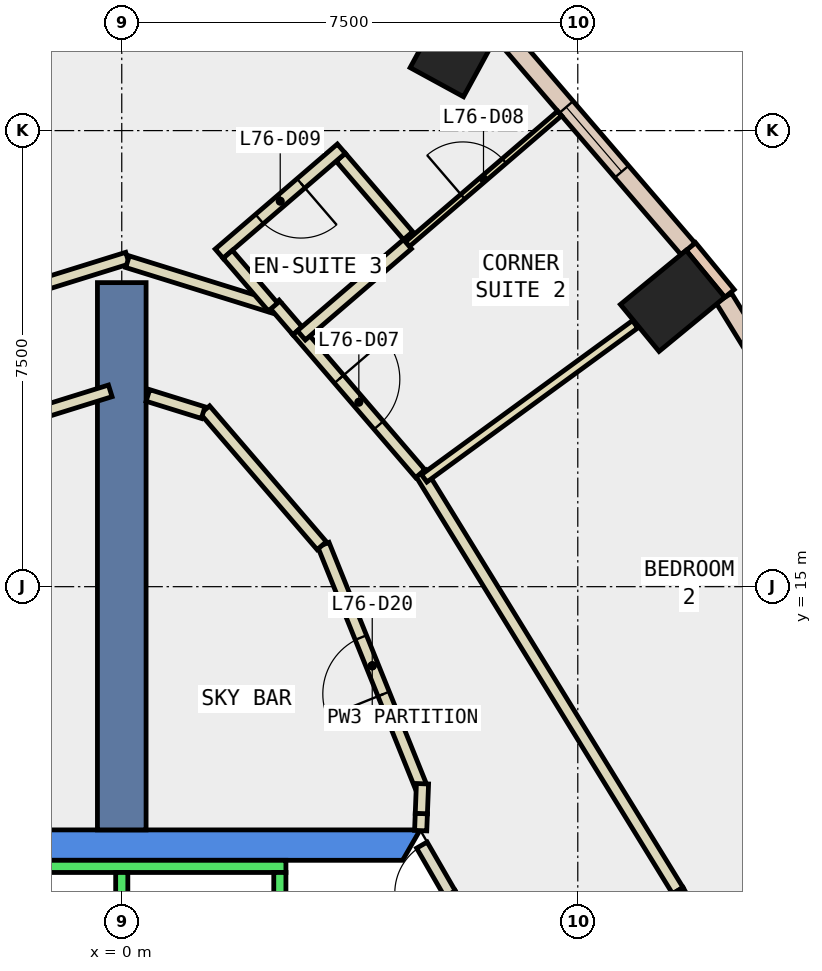
"""IFC4 building model, lengths in metres.
Left out: names, types, materials, properties, quantities, classifications, styles, units other than length and angle.
Written with IfcOpenShell. Run it as: python <this file> out.ifc"""

import sys

from ifc_helpers import new_model, si_unit, direction, frame, frame_2d, origin, origin_2d, place, context, subcontext, project, spatial, polyline, rectangle, outline, extrude, element, fill, save


model = new_model("IFC4")
c1 = context("Model", 3, precision=1e-05, world=origin(), true_north=direction((0.0, 1.0)))
c2 = subcontext(c1, "Body", "Model", "MODEL_VIEW")
j1 = project(units=[si_unit("LENGTHUNIT", "METRE"), si_unit("PLANEANGLEUNIT", "RADIAN")], contexts=[c1])
p1 = place(None, origin())
s1 = spatial("IfcSite", under=j1, at=p1, CompositionType="ELEMENT")
p2 = place(p1, origin())
s2 = spatial("IfcBuilding", under=s1, at=p2, CompositionType="ELEMENT")
p3 = place(p2, frame((0.0, 0.0, 322.4)))
s3 = spatial("IfcBuildingStorey", under=s2, at=p3, CompositionType="ELEMENT", Elevation=322.4)
for number, where, z_axis, x_axis in (
    (1, (9.059, 19.7, -0.34), (0.0, 0.0, 1.0), (-0.636, 0.772, 0.0)),
    (2, (5.517, 23.911, -0.34), (0.0, 0.0, 1.0), (-0.878, 0.479, 0.0)),
):
    element("IfcColumn", number, at=place(p3, frame(where, z_axis=z_axis, x_axis=x_axis)), inside=s3, PredefinedType="COLUMN", context=c2, shape_type="SweptSolid", body=[
        extrude(rectangle(XDim=1.0, YDim=1.4, at=origin_2d()), origin(), (0.0, 0.0, 1.0), 3.34),
    ])
p4 = place(p3, frame((0.0, 0.0, -0.34)))
e3 = element("IfcWall", 3, at=p4, inside=s3, PredefinedType="SHEAR", context=c2, shape_type="SweptSolid", body=[
    extrude(outline(polyline([(5.486, 9.998), (5.053, 9.748), (9.238, 2.5), (9.815, 2.5), (5.486, 9.998)])), origin(), (0.0, 0.0, 1.0), 3.34),
])
p5 = place(p3, frame((0.0, 0.0, -0.34)))
e4 = element("IfcWall", 4, at=p5, inside=s3, PredefinedType="SHEAR", context=c2, shape_type="SweptSolid", body=[
    extrude(outline(polyline([(4.907, 11.0), (-4.907, 11.0), (-4.619, 10.5), (4.619, 10.5), (4.907, 11.0)])), origin(), (0.0, 0.0, 1.0), 3.34),
])
p6 = place(p3, frame((0.0, 11.0, -0.34), z_axis=(0.0, 0.0, 1.0), x_axis=(0.0, 1.0, 0.0)))
e5 = element("IfcWall", 5, at=p6, inside=s3, PredefinedType="SHEAR", context=c2, shape_type="SweptSolid", body=[
    extrude(rectangle(XDim=9.0, YDim=0.8, at=frame_2d((4.5, 0.0))), origin(), (0.0, 0.0, 1.0), 3.34),
])
p7 = place(p3, frame((9.995, 19.822, 0.0), z_axis=(0.0, 0.0, 1.0), x_axis=(-0.635998056672, 0.771690658172, 0.0)))
e6 = element("IfcWall", 6, at=p7, inside=s3, PredefinedType="STANDARD", context=c2, shape_type="SweptSolid", body=[
    extrude(rectangle(XDim=1.0, YDim=0.2, at=frame_2d((0.5, 0.0))), origin(), (0.0, 0.0, 1.0), 3.0),
])
p8 = place(p3, frame((13.823, 13.372, 0.0), z_axis=(0.0, 0.0, 1.0), x_axis=(-0.524004608874, 0.851715427757, 0.0)))
e7 = element("IfcWall", 7, at=p8, inside=s3, PredefinedType="STANDARD", context=c2, shape_type="SweptSolid", body=[
    extrude(rectangle(XDim=7.485, YDim=0.3, at=frame_2d((3.742, 0.0))), origin(), (0.0, 0.0, 1.0), 3.0),
])
p9 = place(p8, frame((0.771, 0.0, 0.9)))
e8 = element("IfcOpeningElement", 8, at=p9, cuts=e7, PredefinedType="OPENING", context=c2, shape_type="SweptSolid", body=[
    extrude(rectangle(XDim=2.2, YDim=2.0, at=frame_2d((1.1, 1.0))), frame((0.0, 0.16, 0.0), z_axis=(0.0, -1.0, 0.0), x_axis=(1.0, 0.0, 0.0)), (0.0, 0.0, 1.0), 0.32),
])
p10 = place(p8, frame((4.514, 0.0, 0.9)))
e9 = element("IfcOpeningElement", 9, at=p10, cuts=e7, PredefinedType="OPENING", context=c2, shape_type="SweptSolid", body=[
    extrude(rectangle(XDim=2.2, YDim=2.0, at=frame_2d((1.1, 1.0))), frame((0.0, 0.16, 0.0), z_axis=(0.0, -1.0, 0.0), x_axis=(1.0, 0.0, 0.0)), (0.0, 0.0, 1.0), 0.32),
])
p11 = place(p3, frame((9.313, 20.555, 0.0), z_axis=(0.0, 0.0, 1.0), x_axis=(-0.651684474108, 0.758490175419, 0.0)))
e10 = element("IfcWall", 10, at=p11, inside=s3, PredefinedType="STANDARD", context=c2, shape_type="SweptSolid", body=[
    extrude(rectangle(XDim=4.748, YDim=0.3, at=frame_2d((2.374, 0.0))), origin(), (0.0, 0.0, 1.0), 3.0),
])
p12 = place(p11, frame((1.674, 0.0, 0.9)))
e11 = element("IfcOpeningElement", 11, at=p12, cuts=e10, PredefinedType="OPENING", context=c2, shape_type="SweptSolid", body=[
    extrude(rectangle(XDim=1.4, YDim=2.0, at=frame_2d((0.7, 1.0))), frame((0.0, 0.16, 0.0), z_axis=(0.0, -1.0, 0.0), x_axis=(1.0, 0.0, 0.0)), (0.0, 0.0, 1.0), 0.32),
])
p13 = place(p3, frame((4.916, 10.988, 0.0), z_axis=(0.0, 0.0, 1.0), x_axis=(0.039066592023, 0.999236609311, 0.0)))
e12 = element("IfcWall", 12, at=p13, inside=s3, PredefinedType="PARTITIONING", context=c2, shape_type="SweptSolid", body=[
    extrude(rectangle(XDim=0.281, YDim=0.2, at=frame_2d((0.141, 0.0))), origin(), (0.0, 0.0, 1.0), 2.4),
])
p14 = place(p3, frame((4.923, 11.707, 0.0), z_axis=(0.0, 0.0, 1.0), x_axis=(-0.374122865642, 0.927379146522, 0.0)))
e13 = element("IfcWall", 13, at=p14, inside=s3, PredefinedType="PARTITIONING", context=c2, shape_type="SweptSolid", body=[
    extrude(rectangle(XDim=4.296, YDim=0.2, at=frame_2d((2.148, 0.0))), origin(), (0.0, 0.0, 1.0), 3.0),
])
p15 = place(p14, frame((1.648, 0.0, 0.0)))
e14 = element("IfcOpeningElement", 14, at=p15, cuts=e13, PredefinedType="OPENING", context=c2, shape_type="SweptSolid", body=[
    extrude(rectangle(XDim=1.0, YDim=2.1, at=frame_2d((0.5, 1.05))), frame((0.0, 0.11, 0.0), z_axis=(0.0, -1.0, 0.0), x_axis=(1.0, 0.0, 0.0)), (0.0, 0.0, 1.0), 0.22),
])
p16 = place(p3, frame((3.289, 15.674, 0.0), z_axis=(0.0, 0.0, 1.0), x_axis=(-0.651848676423, 0.758349064116, 0.0)))
e15 = element("IfcWall", 15, at=p16, inside=s3, PredefinedType="PARTITIONING", context=c2, shape_type="SweptSolid", body=[
    extrude(rectangle(XDim=2.946, YDim=0.2, at=frame_2d((1.473, 0.0))), origin(), (0.0, 0.0, 1.0), 3.0),
])
p17 = place(p3, frame((1.339, 17.862, 0.0), z_axis=(0.0, 0.0, 1.0), x_axis=(-0.954826063502, 0.297165254457, 0.0)))
e16 = element("IfcWall", 16, at=p17, inside=s3, PredefinedType="PARTITIONING", context=c2, shape_type="SweptSolid", body=[
    extrude(rectangle(XDim=0.952, YDim=0.2, at=frame_2d((0.476, 0.0))), origin(), (0.0, 0.0, 1.0), 3.0),
])
p18 = place(p3, frame((-0.189, 18.22, 0.0), z_axis=(0.0, 0.0, 1.0), x_axis=(-0.954836332451, -0.297132257137, 0.0)))
e17 = element("IfcWall", 17, at=p18, inside=s3, PredefinedType="PARTITIONING", context=c2, shape_type="SweptSolid", body=[
    extrude(rectangle(XDim=1.205, YDim=0.2, at=frame_2d((0.602, 0.0))), origin(), (0.0, 0.0, 1.0), 3.0),
])
p19 = place(p3, frame((4.922, 16.867, 0.0), z_axis=(0.0, 0.0, 1.0), x_axis=(0.523943621984, -0.851752945978, 0.0)))
e18 = element("IfcWall", 18, at=p19, inside=s3, PredefinedType="PARTITIONING", context=c2, shape_type="SweptSolid", body=[
    extrude(rectangle(XDim=8.06, YDim=0.2, at=frame_2d((4.03, 0.0))), origin(), (0.0, 0.0, 1.0), 3.0),
])
p20 = place(p3, frame((9.145, 10.002, 0.0), z_axis=(0.0, 0.0, 1.0), x_axis=(0.499798886082, -0.866141485827, 0.0)))
e19 = element("IfcWall", 19, at=p20, inside=s3, PredefinedType="PARTITIONING", context=c2, shape_type="SweptSolid", body=[
    extrude(rectangle(XDim=1.198, YDim=0.2, at=frame_2d((0.599, 0.0))), origin(), (0.0, 0.0, 1.0), 3.0),
])
p21 = place(p3, frame((2.889, 19.209, 0.0), z_axis=(0.0, 0.0, 1.0), x_axis=(0.651686040861, -0.758488829283, 0.0)))
e20 = element("IfcWall", 20, at=p21, inside=s3, PredefinedType="PARTITIONING", context=c2, shape_type="SweptSolid", body=[
    extrude(rectangle(XDim=3.1, YDim=0.2, at=frame_2d((1.55, 0.0))), origin(), (0.0, 0.0, 1.0), 3.0),
])
p22 = place(p21, frame((1.05, 0.0, 0.0)))
e21 = element("IfcOpeningElement", 21, at=p22, cuts=e20, PredefinedType="OPENING", context=c2, shape_type="SweptSolid", body=[
    extrude(rectangle(XDim=1.0, YDim=2.1, at=frame_2d((0.5, 1.05))), frame((0.0, 0.11, 0.0), z_axis=(0.0, -1.0, 0.0), x_axis=(1.0, 0.0, 0.0)), (0.0, 0.0, 1.0), 0.22),
])
p23 = place(p3, frame((-2.482, 19.601, 0.0), z_axis=(0.0, 0.0, 1.0), x_axis=(0.95482540871, 0.297167358372, 0.0)))
e22 = element("IfcWall", 22, at=p23, inside=s3, PredefinedType="PARTITIONING", context=c2, shape_type="SweptSolid", body=[
    extrude(rectangle(XDim=2.699, YDim=0.2, at=frame_2d((1.349, 0.0))), origin(), (0.0, 0.0, 1.0), 3.0),
])
p24 = place(p3, frame((0.095, 20.344, 0.0), z_axis=(0.0, 0.0, 1.0), x_axis=(0.954837867825, -0.297127323158, 0.0)))
e23 = element("IfcWall", 23, at=p24, inside=s3, PredefinedType="PARTITIONING", context=c2, shape_type="SweptSolid", body=[
    extrude(rectangle(XDim=2.605, YDim=0.2, at=frame_2d((1.302, 0.0))), origin(), (0.0, 0.0, 1.0), 3.0),
])
p25 = place(p3, frame((2.512, 19.647, 0.0), z_axis=(0.0, 0.0, 1.0), x_axis=(0.652320947019, -0.757942862016, 0.0)))
e24 = element("IfcWall", 24, at=p25, inside=s3, PredefinedType="PARTITIONING", context=c2, shape_type="SweptSolid", body=[
    extrude(rectangle(XDim=0.578, YDim=0.2, at=frame_2d((0.289, 0.0))), origin(), (0.0, 0.0, 1.0), 3.0),
])
p26 = place(p3, frame((11.959, 10.127, 0.0), z_axis=(0.0, 0.0, 1.0), x_axis=(-0.866022959057, -0.500004234368, 0.0)))
e25 = element("IfcWall", 25, at=p26, inside=s3, PredefinedType="PARTITIONING", context=c2, shape_type="SweptSolid", body=[
    extrude(rectangle(XDim=2.5, YDim=0.2, at=frame_2d((1.25, 0.0))), origin(), (0.0, 0.0, 1.0), 3.0),
])
p27 = place(p3, frame((4.974, 16.782, 0.0), z_axis=(0.0, 0.0, 1.0), x_axis=(0.807621211013, 0.589701602102, 0.0)))
e26 = element("IfcWall", 26, at=p27, inside=s3, PredefinedType="PARTITIONING", context=c2, shape_type="SweptSolid", body=[
    extrude(rectangle(XDim=4.295, YDim=0.15, at=frame_2d((2.148, 0.0))), origin(), (0.0, 0.0, 1.0), 3.0),
])
p28 = place(p3, frame((4.698, 20.632, 0.0), z_axis=(0.0, 0.0, 1.0), x_axis=(0.75843091069, 0.651753445491, 0.0)))
e27 = element("IfcWall", 27, at=p28, inside=s3, PredefinedType="PARTITIONING", context=c2, shape_type="SweptSolid", body=[
    extrude(rectangle(XDim=3.3, YDim=0.1, at=frame_2d((1.65, 0.0))), origin(), (0.0, 0.0, 1.0), 3.0),
])
p29 = place(p28, frame((1.2, 0.0, 0.0)))
e28 = element("IfcOpeningElement", 28, at=p29, cuts=e27, PredefinedType="OPENING", context=c2, shape_type="SweptSolid", body=[
    extrude(rectangle(XDim=0.9, YDim=2.1, at=frame_2d((0.45, 1.05))), frame((0.0, 0.06, 0.0), z_axis=(0.0, -1.0, 0.0), x_axis=(1.0, 0.0, 0.0)), (0.0, 0.0, 1.0), 0.12),
])
p30 = place(p3, frame((2.954, 19.133, 0.0), z_axis=(0.0, 0.0, 1.0), x_axis=(0.758341579104, 0.65185738425, 0.0)))
e29 = element("IfcWall", 29, at=p30, inside=s3, PredefinedType="PARTITIONING", context=c2, shape_type="SweptSolid", body=[
    extrude(rectangle(XDim=2.3, YDim=0.2, at=frame_2d((1.15, 0.0))), origin(), (0.0, 0.0, 1.0), 3.0),
])
p31 = place(p3, frame((4.709, 20.773, 0.0), z_axis=(0.0, 0.0, 1.0), x_axis=(-0.651808051275, 0.758383982092, 0.0)))
e30 = element("IfcWall", 30, at=p31, inside=s3, PredefinedType="PARTITIONING", context=c2, shape_type="SweptSolid", body=[
    extrude(rectangle(XDim=1.7, YDim=0.2, at=frame_2d((0.85, 0.0))), origin(), (0.0, 0.0, 1.0), 3.0),
])
p32 = place(p3, frame((3.611, 22.203, 0.0), z_axis=(0.0, 0.0, 1.0), x_axis=(-0.75836467248, -0.651830517493, 0.0)))
e31 = element("IfcWall", 31, at=p32, inside=s3, PredefinedType="PARTITIONING", context=c2, shape_type="SweptSolid", body=[
    extrude(rectangle(XDim=2.649, YDim=0.2, at=frame_2d((1.325, 0.0))), origin(), (0.0, 0.0, 1.0), 3.0),
])
p33 = place(p32, frame((0.875, 0.0, 0.0)))
e32 = element("IfcOpeningElement", 32, at=p33, cuts=e31, PredefinedType="OPENING", context=c2, shape_type="SweptSolid", body=[
    extrude(rectangle(XDim=0.9, YDim=2.1, at=frame_2d((0.45, 1.05))), frame((0.0, 0.11, 0.0), z_axis=(0.0, -1.0, 0.0), x_axis=(1.0, 0.0, 0.0)), (0.0, 0.0, 1.0), 0.22),
])
p34 = place(p3, frame((1.743, 20.465, 0.0), z_axis=(0.0, 0.0, 1.0), x_axis=(0.65174176003, -0.758440952371, 0.0)))
e33 = element("IfcWall", 33, at=p34, inside=s3, PredefinedType="PARTITIONING", context=c2, shape_type="SweptSolid", body=[
    extrude(rectangle(XDim=1.142, YDim=0.2, at=frame_2d((0.571, 0.0))), origin(), (0.0, 0.0, 1.0), 3.0),
])
p35 = place(p3, frame((5.399, 9.948, 0.0), z_axis=(0.0, 0.0, 1.0), x_axis=(-0.499882215713, 0.866093395895, 0.0)))
e34 = element("IfcWall", 34, at=p35, inside=s3, PredefinedType="PARTITIONING", context=c2, shape_type="SweptSolid", body=[
    extrude(rectangle(XDim=0.926, YDim=0.2, at=frame_2d((0.463, 0.0))), origin(), (0.0, 0.0, 1.0), 2.4),
])
p36 = place(p35, frame((0.017, 0.0, 0.0)))
e35 = element("IfcOpeningElement", 35, at=p36, cuts=e34, PredefinedType="OPENING", context=c2, shape_type="SweptSolid", body=[
    extrude(rectangle(XDim=0.9, YDim=2.1, at=frame_2d((0.45, 1.05))), frame((0.0, 0.11, 0.0), z_axis=(0.0, -1.0, 0.0), x_axis=(1.0, 0.0, 0.0)), (0.0, 0.0, 1.0), 0.22),
])
p37 = place(p3, frame((4.927, 11.269, 0.0), z_axis=(0.0, 0.0, 1.0), x_axis=(0.038834659047, 0.999245650106, 0.0)))
e36 = element("IfcWall", 36, at=p37, inside=s3, PredefinedType="PARTITIONING", context=c2, shape_type="SweptSolid", body=[
    extrude(rectangle(XDim=0.49, YDim=0.2, at=frame_2d((0.245, 0.0))), origin(), (0.0, 0.0, 1.0), 3.0),
])
p38 = place(p3, frame((2.7, 10.4, 0.0), z_axis=(0.0, 0.0, 1.0), x_axis=(-1.0, 0.0, 0.0)))
e37 = element("IfcWall", 37, at=p38, inside=s3, PredefinedType="STANDARD", context=c2, shape_type="SweptSolid", body=[
    extrude(rectangle(XDim=5.4, YDim=0.2, at=frame_2d((2.7, 0.0))), origin(), (0.0, 0.0, 1.0), 3.0),
])
for number, where, z_axis, x_axis in (
    (38, (2.6, 7.9, 0.0), (0.0, 0.0, 1.0), (0.0, 1.0, 0.0)),
    (39, (0.0, 7.9, 0.0), (0.0, 0.0, 1.0), (0.0, 1.0, 0.0)),
):
    element("IfcWall", number, at=place(p3, frame(where, z_axis=z_axis, x_axis=x_axis)), inside=s3, PredefinedType="STANDARD", context=c2, shape_type="SweptSolid", body=[
        extrude(rectangle(XDim=2.4, YDim=0.2, at=frame_2d((1.2, 0.0))), origin(), (0.0, 0.0, 1.0), 3.0),
    ])
p39 = place(p12, origin())
e40 = element("IfcWindow", 40, at=p39, inside=s3, PartitioningType="SINGLE_PANEL", PredefinedType="WINDOW", context=c2, shape_type="SweptSolid", body=[
    extrude(rectangle(XDim=1.4, YDim=2.0, at=frame_2d((0.7, 1.0))), frame((0.0, 0.03, 0.0), z_axis=(0.0, -1.0, 0.0), x_axis=(1.0, 0.0, 0.0)), (0.0, 0.0, 1.0), 0.06),
])
fill(e11, e40)
p40 = place(p22, origin())
e41 = element("IfcDoor", 41, at=p40, inside=s3, OperationType="SINGLE_SWING_LEFT", PredefinedType="DOOR", context=c2, shape_type="SweptSolid", body=[
    extrude(rectangle(XDim=1.0, YDim=2.1, at=frame_2d((0.5, 1.05))), frame((0.0, 0.025, 0.0), z_axis=(0.0, -1.0, 0.0), x_axis=(1.0, 0.0, 0.0)), (0.0, 0.0, 1.0), 0.05),
])
fill(e21, e41)
p41 = place(p29, origin())
e42 = element("IfcDoor", 42, at=p41, inside=s3, OperationType="SINGLE_SWING_RIGHT", PredefinedType="DOOR", context=c2, shape_type="SweptSolid", body=[
    extrude(rectangle(XDim=0.9, YDim=2.1, at=frame_2d((0.45, 1.05))), frame((0.0, 0.025, 0.0), z_axis=(0.0, -1.0, 0.0), x_axis=(1.0, 0.0, 0.0)), (0.0, 0.0, 1.0), 0.05),
])
fill(e28, e42)
p42 = place(p33, origin())
e43 = element("IfcDoor", 43, at=p42, inside=s3, OperationType="SINGLE_SWING_LEFT", PredefinedType="DOOR", context=c2, shape_type="SweptSolid", body=[
    extrude(rectangle(XDim=0.9, YDim=2.1, at=frame_2d((0.45, 1.05))), frame((0.0, 0.025, 0.0), z_axis=(0.0, -1.0, 0.0), x_axis=(1.0, 0.0, 0.0)), (0.0, 0.0, 1.0), 0.05),
])
fill(e32, e43)
p43 = place(p15, origin())
e44 = element("IfcDoor", 44, at=p43, inside=s3, OperationType="SINGLE_SWING_LEFT", PredefinedType="DOOR", context=c2, shape_type="SweptSolid", body=[
    extrude(rectangle(XDim=1.0, YDim=2.1, at=frame_2d((0.5, 1.05))), frame((0.0, 0.025, 0.0), z_axis=(0.0, -1.0, 0.0), x_axis=(1.0, 0.0, 0.0)), (0.0, 0.0, 1.0), 0.05),
])
fill(e14, e44)
p44 = place(p36, origin())
e45 = element("IfcDoor", 45, at=p44, inside=s3, OperationType="SINGLE_SWING_LEFT", PredefinedType="DOOR", context=c2, shape_type="SweptSolid", body=[
    extrude(rectangle(XDim=0.9, YDim=2.1, at=frame_2d((0.45, 1.05))), frame((0.0, 0.025, 0.0), z_axis=(0.0, -1.0, 0.0), x_axis=(1.0, 0.0, 0.0)), (0.0, 0.0, 1.0), 0.05),
])
fill(e35, e45)
save(model, sys.argv[1])
